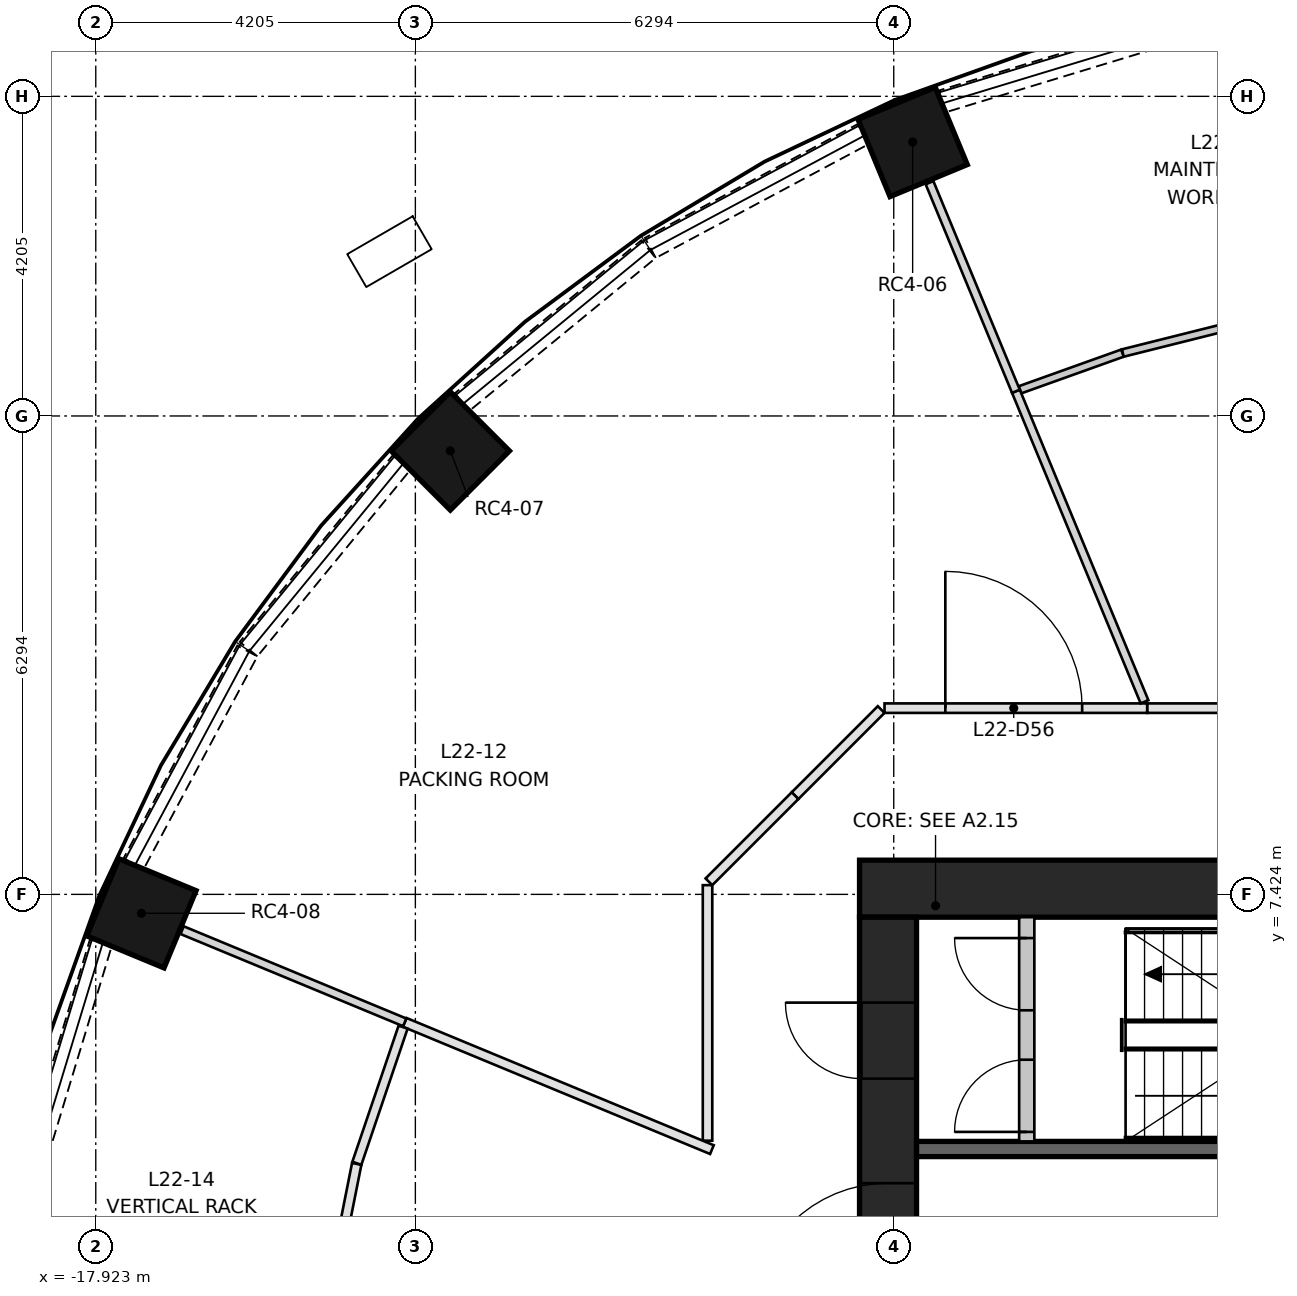
"""IFC4 building model, lengths in metres.
Left out: names, types, materials, properties, quantities, classifications, styles, units other than length and angle.
Written with IfcOpenShell. Run it as: python <this file> out.ifc"""

import sys

from ifc_helpers import new_model, si_unit, direction, frame, frame_2d, origin, origin_2d, place, context, subcontext, project, spatial, rectangle, extrude, element, fill, save


model = new_model("IFC4")
c1 = context("Model", 3, precision=1e-05, world=origin(), true_north=direction((0.0, 1.0)))
c2 = subcontext(c1, "Body", "Model", "MODEL_VIEW")
j1 = project(units=[si_unit("LENGTHUNIT", "METRE"), si_unit("PLANEANGLEUNIT", "RADIAN")], contexts=[c1])
p1 = place(None, origin())
s1 = spatial("IfcSite", under=j1, at=p1, CompositionType="ELEMENT")
p2 = place(p1, origin())
s2 = spatial("IfcBuilding", under=s1, at=p2, CompositionType="ELEMENT")
p3 = place(p2, frame((0.0, 0.0, 87.35)))
s3 = spatial("IfcBuildingStorey", under=s2, at=p3, CompositionType="ELEMENT", Elevation=87.35)
for number, where, z_axis, x_axis in (
    (1, (-7.175, 17.323, 0.0), (0.0, 0.0, 1.0), (-0.383, 0.924, 0.0)),
    (2, (-13.258, 13.258, 0.0), (0.0, 0.0, 1.0), (-0.707, 0.707, 0.0)),
    (3, (-17.323, 7.175, 0.0), (0.0, 0.0, 1.0), (-0.924, 0.383, 0.0)),
):
    element("IfcColumn", number, at=place(p3, frame(where, z_axis=z_axis, x_axis=x_axis)), inside=s3, PredefinedType="COLUMN", context=c2, shape_type="SweptSolid", body=[
        extrude(rectangle(XDim=1.1, YDim=1.1, at=origin_2d()), origin(), (0.0, 0.0, 1.0), 3.65),
    ])
p4 = place(p3, frame((-7.874, 7.499, 0.0), z_axis=(0.0, 0.0, 1.0), x_axis=(1.0, 0.0, 0.0)))
e4 = element("IfcWall", 4, at=p4, inside=s3, PredefinedType="SHEAR", context=c2, shape_type="SweptSolid", body=[
    extrude(rectangle(XDim=15.748, YDim=0.75, at=frame_2d((7.874, 0.0))), origin(), (0.0, 0.0, 1.0), 3.65),
])
p5 = place(p3, frame((-7.499, -7.124, 0.0), z_axis=(0.0, 0.0, 1.0), x_axis=(0.0, 1.0, 0.0)))
e5 = element("IfcWall", 5, at=p5, inside=s3, PredefinedType="SHEAR", context=c2, shape_type="SweptSolid", body=[
    extrude(rectangle(XDim=14.248, YDim=0.75, at=frame_2d((7.124, 0.0))), origin(), (0.0, 0.0, 1.0), 3.65),
])
p6 = place(p5, frame((6.624, 0.0, 0.0)))
e6 = element("IfcOpeningElement", 6, at=p6, cuts=e5, PredefinedType="OPENING", context=c2, shape_type="SweptSolid", body=[
    extrude(rectangle(XDim=1.0, YDim=2.1, at=frame_2d((0.5, 1.05))), frame((0.0, 0.385, 0.0), z_axis=(0.0, -1.0, 0.0), x_axis=(1.0, 0.0, 0.0)), (0.0, 0.0, 1.0), 0.77),
])
p7 = place(p5, frame((3.5, 0.0, 0.0)))
e7 = element("IfcOpeningElement", 7, at=p7, cuts=e5, PredefinedType="OPENING", context=c2, shape_type="SweptSolid", body=[
    extrude(rectangle(XDim=1.8, YDim=2.1, at=frame_2d((0.9, 1.05))), frame((0.0, 0.385, 0.0), z_axis=(0.0, -1.0, 0.0), x_axis=(1.0, 0.0, 0.0)), (0.0, 0.0, 1.0), 0.77),
])
p8 = place(p5, frame((8.948, 0.0, 0.0)))
e8 = element("IfcOpeningElement", 8, at=p8, cuts=e5, PredefinedType="OPENING", context=c2, shape_type="SweptSolid", body=[
    extrude(rectangle(XDim=1.8, YDim=2.1, at=frame_2d((0.9, 1.05))), frame((0.0, 0.385, 0.0), z_axis=(0.0, -1.0, 0.0), x_axis=(1.0, 0.0, 0.0)), (0.0, 0.0, 1.0), 0.77),
])
p9 = place(p5, frame((12.124, 0.0, 0.0)))
e9 = element("IfcOpeningElement", 9, at=p9, cuts=e5, PredefinedType="OPENING", context=c2, shape_type="SweptSolid", body=[
    extrude(rectangle(XDim=1.0, YDim=2.1, at=frame_2d((0.5, 1.05))), frame((0.0, 0.385, 0.0), z_axis=(0.0, -1.0, 0.0), x_axis=(1.0, 0.0, 0.0)), (0.0, 0.0, 1.0), 0.77),
])
p10 = place(p3, frame((-7.124, 4.074, 0.0), z_axis=(0.0, 0.0, 1.0), x_axis=(1.0, 0.0, 0.0)))
e10 = element("IfcWall", 10, at=p10, inside=s3, PredefinedType="SHEAR", context=c2, shape_type="SweptSolid", body=[
    extrude(rectangle(XDim=7.124, YDim=0.2, at=frame_2d((3.562, 0.0))), origin(), (0.0, 0.0, 1.0), 3.3),
])
p11 = place(p3, frame((-5.674, 4.174, 0.0), z_axis=(0.0, 0.0, 1.0), x_axis=(0.0, 1.0, 0.0)))
e11 = element("IfcWall", 11, at=p11, inside=s3, PredefinedType="PARTITIONING", context=c2, shape_type="SweptSolid", body=[
    extrude(rectangle(XDim=2.95, YDim=0.2, at=frame_2d((1.475, 0.0))), origin(), (0.0, 0.0, 1.0), 3.3),
])
p12 = place(p11, frame((0.125, 0.0, 0.0)))
e12 = element("IfcOpeningElement", 12, at=p12, cuts=e11, PredefinedType="OPENING", context=c2, shape_type="SweptSolid", body=[
    extrude(rectangle(XDim=0.95, YDim=2.1, at=frame_2d((0.475, 1.05))), frame((0.0, 0.11, 0.0), z_axis=(0.0, -1.0, 0.0), x_axis=(1.0, 0.0, 0.0)), (0.0, 0.0, 1.0), 0.22),
])
p13 = place(p11, frame((1.725, 0.0, 0.0)))
e13 = element("IfcOpeningElement", 13, at=p13, cuts=e11, PredefinedType="OPENING", context=c2, shape_type="SweptSolid", body=[
    extrude(rectangle(XDim=0.95, YDim=2.1, at=frame_2d((0.475, 1.05))), frame((0.0, 0.11, 0.0), z_axis=(0.0, -1.0, 0.0), x_axis=(1.0, 0.0, 0.0)), (0.0, 0.0, 1.0), 0.22),
])
p14 = place(p3, frame((-3.75, 18.778, 0.0), z_axis=(0.0, 0.0, 1.0), x_axis=(-0.956927923582, -0.290325591482, 0.0)))
e14 = element("IfcWall", 14, at=p14, inside=s3, PredefinedType="SOLIDWALL", context=c2, shape_type="SweptSolid", body=[
    extrude(rectangle(XDim=3.173, YDim=0.3, at=frame_2d((1.586, 0.0))), origin(), (0.0, 0.0, 1.0), 0.9),
])
p15 = place(p3, frame((-7.828, 17.425, 0.0), z_axis=(0.0, 0.0, 1.0), x_axis=(-0.88188808669, -0.471458802606, 0.0)))
e15 = element("IfcWall", 15, at=p15, inside=s3, PredefinedType="SOLIDWALL", context=c2, shape_type="SweptSolid", body=[
    extrude(rectangle(XDim=3.172, YDim=0.3, at=frame_2d((1.586, 0.0))), origin(), (0.0, 0.0, 1.0), 0.9),
])
for number, where, z_axis, x_axis in (
    (16, (-10.651, 15.913, 0.0), (0.0, 0.0, 1.0), (-0.773, -0.634, 0.0)),
    (17, (-13.9, 13.104, 0.0), (0.0, 0.0, 1.0), (-0.634, -0.773, 0.0)),
):
    element("IfcWall", number, at=place(p3, frame(where, z_axis=z_axis, x_axis=x_axis)), inside=s3, PredefinedType="SOLIDWALL", context=c2, shape_type="SweptSolid", body=[
        extrude(rectangle(XDim=3.173, YDim=0.3, at=frame_2d((1.586, 0.0))), origin(), (0.0, 0.0, 1.0), 0.9),
    ])
p16 = place(p3, frame((-15.929, 10.626, 0.0), z_axis=(0.0, 0.0, 1.0), x_axis=(-0.471458802606, -0.88188808669, 0.0)))
e18 = element("IfcWall", 18, at=p16, inside=s3, PredefinedType="SOLIDWALL", context=c2, shape_type="SweptSolid", body=[
    extrude(rectangle(XDim=3.172, YDim=0.3, at=frame_2d((1.586, 0.0))), origin(), (0.0, 0.0, 1.0), 0.9),
])
p17 = place(p3, frame((-17.856, 6.787, 0.0), z_axis=(0.0, 0.0, 1.0), x_axis=(-0.290325591482, -0.956927923582, 0.0)))
e19 = element("IfcWall", 19, at=p17, inside=s3, PredefinedType="SOLIDWALL", context=c2, shape_type="SweptSolid", body=[
    extrude(rectangle(XDim=3.173, YDim=0.3, at=frame_2d((1.586, 0.0))), origin(), (0.0, 0.0, 1.0), 0.9),
])
p18 = place(p3, frame((-4.09, 9.874, 0.0), z_axis=(0.0, 0.0, 1.0), x_axis=(1.0, 0.0, 0.0)))
e20 = element("IfcWall", 20, at=p18, inside=s3, PredefinedType="PARTITIONING", context=c2, shape_type="SweptSolid", body=[
    extrude(rectangle(XDim=8.18, YDim=0.125, at=frame_2d((4.09, 0.0))), origin(), (0.0, 0.0, 1.0), 3.3),
])
p19 = place(p18, frame((3.6, 0.0, 0.0)))
e21 = element("IfcOpeningElement", 21, at=p19, cuts=e20, PredefinedType="OPENING", context=c2, shape_type="SweptSolid", body=[
    extrude(rectangle(XDim=1.0, YDim=2.1, at=frame_2d((0.5, 1.05))), frame((0.0, 0.073, 0.0), z_axis=(0.0, -1.0, 0.0), x_axis=(1.0, 0.0, 0.0)), (0.0, 0.0, 1.0), 0.145),
])
p20 = place(p3, frame((-8.722, 8.722, 0.0), z_axis=(0.0, 0.0, 1.0), x_axis=(0.707030604857, 0.70718294931, 0.0)))
e22 = element("IfcWall", 22, at=p20, inside=s3, PredefinedType="PARTITIONING", context=c2, shape_type="SweptSolid", body=[
    extrude(rectangle(XDim=1.603, YDim=0.125, at=frame_2d((0.801, 0.0))), origin(), (0.0, 0.0, 1.0), 3.3),
])
p21 = place(p3, frame((-7.545, 9.874, 0.0), z_axis=(0.0, 0.0, 1.0), x_axis=(1.0, 0.0, 0.0)))
e23 = element("IfcWall", 23, at=p21, inside=s3, PredefinedType="PARTITIONING", context=c2, shape_type="SweptSolid", body=[
    extrude(rectangle(XDim=3.455, YDim=0.125, at=frame_2d((1.728, 0.0))), origin(), (0.0, 0.0, 1.0), 3.3),
])
p22 = place(p21, frame((0.8, 0.0, 0.0)))
e24 = element("IfcOpeningElement", 24, at=p22, cuts=e23, PredefinedType="OPENING", context=c2, shape_type="SweptSolid", body=[
    extrude(rectangle(XDim=1.8, YDim=2.1, at=frame_2d((0.9, 1.05))), frame((0.0, 0.073, 0.0), z_axis=(0.0, -1.0, 0.0), x_axis=(1.0, 0.0, 0.0)), (0.0, 0.0, 1.0), 0.145),
])
p23 = place(p3, frame((-9.874, 4.183, 0.0), z_axis=(0.0, 0.0, 1.0), x_axis=(0.0, 1.0, 0.0)))
e25 = element("IfcWall", 25, at=p23, inside=s3, PredefinedType="PARTITIONING", context=c2, shape_type="SweptSolid", body=[
    extrude(rectangle(XDim=3.362, YDim=0.125, at=frame_2d((1.681, 0.0))), origin(), (0.0, 0.0, 1.0), 3.3),
])
p24 = place(p3, frame((-9.856, 7.589, 0.0), z_axis=(0.0, 0.0, 1.0), x_axis=(0.70718294931, 0.707030604857, 0.0)))
e26 = element("IfcWall", 26, at=p24, inside=s3, PredefinedType="PARTITIONING", context=c2, shape_type="SweptSolid", body=[
    extrude(rectangle(XDim=1.603, YDim=0.125, at=frame_2d((0.801, 0.0))), origin(), (0.0, 0.0, 1.0), 3.3),
])
p25 = place(p3, frame((-5.763, 14.062, 0.0), z_axis=(0.0, 0.0, 1.0), x_axis=(0.941587499657, 0.33676843749, 0.0)))
e27 = element("IfcWall", 27, at=p25, inside=s3, PredefinedType="PARTITIONING", context=c2, shape_type="SweptSolid", body=[
    extrude(rectangle(XDim=1.432, YDim=0.1, at=frame_2d((0.716, 0.0))), origin(), (0.0, 0.0, 1.0), 3.3),
])
p26 = place(p3, frame((-4.41, 14.546, 0.0), z_axis=(0.0, 0.0, 1.0), x_axis=(0.970055497102, 0.242883372306, 0.0)))
e28 = element("IfcWall", 28, at=p26, inside=s3, PredefinedType="PARTITIONING", context=c2, shape_type="SweptSolid", body=[
    extrude(rectangle(XDim=1.487, YDim=0.1, at=frame_2d((0.743, 0.0))), origin(), (0.0, 0.0, 1.0), 3.3),
])
p27 = place(p3, frame((-4.125, 9.958, 0.0), z_axis=(0.0, 0.0, 1.0), x_axis=(-0.382709362011, 0.923868791674, 0.0)))
e29 = element("IfcWall", 29, at=p27, inside=s3, PredefinedType="PARTITIONING", context=c2, shape_type="SweptSolid", body=[
    extrude(rectangle(XDim=4.422, YDim=0.11, at=frame_2d((2.211, 0.0))), origin(), (0.0, 0.0, 1.0), 3.3),
])
p28 = place(p3, frame((-5.817, 14.043, 0.0), z_axis=(0.0, 0.0, 1.0), x_axis=(-0.382659139036, 0.923889594764, 0.0)))
e30 = element("IfcWall", 30, at=p28, inside=s3, PredefinedType="PARTITIONING", context=c2, shape_type="SweptSolid", body=[
    extrude(rectangle(XDim=2.97, YDim=0.11, at=frame_2d((1.485, 0.0))), origin(), (0.0, 0.0, 1.0), 3.3),
])
p29 = place(p3, frame((-9.816, 4.066, 0.0), z_axis=(0.0, 0.0, 1.0), x_axis=(-0.923865829688, 0.382716512232, 0.0)))
e31 = element("IfcWall", 31, at=p29, inside=s3, PredefinedType="PARTITIONING", context=c2, shape_type="SweptSolid", body=[
    extrude(rectangle(XDim=4.375, YDim=0.125, at=frame_2d((2.188, 0.0))), origin(), (0.0, 0.0, 1.0), 3.3),
])
p30 = place(p3, frame((-13.858, 5.74, 0.0), z_axis=(0.0, 0.0, 1.0), x_axis=(-0.923876970079, 0.382689618566, 0.0)))
e32 = element("IfcWall", 32, at=p30, inside=s3, PredefinedType="PARTITIONING", context=c2, shape_type="SweptSolid", body=[
    extrude(rectangle(XDim=3.17, YDim=0.11, at=frame_2d((1.585, 0.0))), origin(), (0.0, 0.0, 1.0), 3.3),
])
p31 = place(p3, frame((-14.871, 1.962, 0.0), z_axis=(0.0, 0.0, 1.0), x_axis=(0.195034785279, 0.980796325713, 0.0)))
e33 = element("IfcWall", 33, at=p31, inside=s3, PredefinedType="PARTITIONING", context=c2, shape_type="SweptSolid", body=[
    extrude(rectangle(XDim=1.954, YDim=0.125, at=frame_2d((0.977, 0.0))), origin(), (0.0, 0.0, 1.0), 3.3),
])
p32 = place(p3, frame((-14.488, 3.886, 0.0), z_axis=(0.0, 0.0, 1.0), x_axis=(0.321451389675, 0.946926081633, 0.0)))
e34 = element("IfcWall", 34, at=p32, inside=s3, PredefinedType="PARTITIONING", context=c2, shape_type="SweptSolid", body=[
    extrude(rectangle(XDim=1.891, YDim=0.125, at=frame_2d((0.946, 0.0))), origin(), (0.0, 0.0, 1.0), 3.3),
])
p33 = place(p12, origin())
e35 = element("IfcDoor", 35, at=p33, inside=s3, OperationType="SINGLE_SWING_LEFT", PredefinedType="DOOR", context=c2, shape_type="SweptSolid", body=[
    extrude(rectangle(XDim=0.95, YDim=2.1, at=frame_2d((0.475, 1.05))), frame((0.0, 0.025, 0.0), z_axis=(0.0, -1.0, 0.0), x_axis=(1.0, 0.0, 0.0)), (0.0, 0.0, 1.0), 0.05),
])
fill(e12, e35)
p34 = place(p13, origin())
e36 = element("IfcDoor", 36, at=p34, inside=s3, OperationType="SINGLE_SWING_RIGHT", PredefinedType="DOOR", context=c2, shape_type="SweptSolid", body=[
    extrude(rectangle(XDim=0.95, YDim=2.1, at=frame_2d((0.475, 1.05))), frame((0.0, 0.025, 0.0), z_axis=(0.0, -1.0, 0.0), x_axis=(1.0, 0.0, 0.0)), (0.0, 0.0, 1.0), 0.05),
])
fill(e13, e36)
p35 = place(p8, origin())
e37 = element("IfcDoor", 37, at=p35, inside=s3, OperationType="DOUBLE_DOOR_SINGLE_SWING", PredefinedType="DOOR", context=c2, shape_type="SweptSolid", body=[
    extrude(rectangle(XDim=1.8, YDim=2.1, at=frame_2d((0.9, 1.05))), frame((0.0, 0.025, 0.0), z_axis=(0.0, -1.0, 0.0), x_axis=(1.0, 0.0, 0.0)), (0.0, 0.0, 1.0), 0.05),
])
fill(e8, e37)
p36 = place(p9, origin())
e38 = element("IfcDoor", 38, at=p36, inside=s3, OperationType="SINGLE_SWING_RIGHT", PredefinedType="DOOR", context=c2, shape_type="SweptSolid", body=[
    extrude(rectangle(XDim=1.0, YDim=2.1, at=frame_2d((0.5, 1.05))), frame((0.0, 0.375, 0.0), z_axis=(0.0, -1.0, 0.0), x_axis=(1.0, 0.0, 0.0)), (0.0, 0.0, 1.0), 0.05),
])
fill(e9, e38)
p37 = place(p22, origin())
e39 = element("IfcDoor", 39, at=p37, inside=s3, OperationType="DOUBLE_DOOR_SINGLE_SWING", PredefinedType="DOOR", context=c2, shape_type="SweptSolid", body=[
    extrude(rectangle(XDim=1.8, YDim=2.1, at=frame_2d((0.9, 1.05))), frame((0.0, 0.025, 0.0), z_axis=(0.0, -1.0, 0.0), x_axis=(1.0, 0.0, 0.0)), (0.0, 0.0, 1.0), 0.05),
])
fill(e24, e39)
save(model, sys.argv[1])
